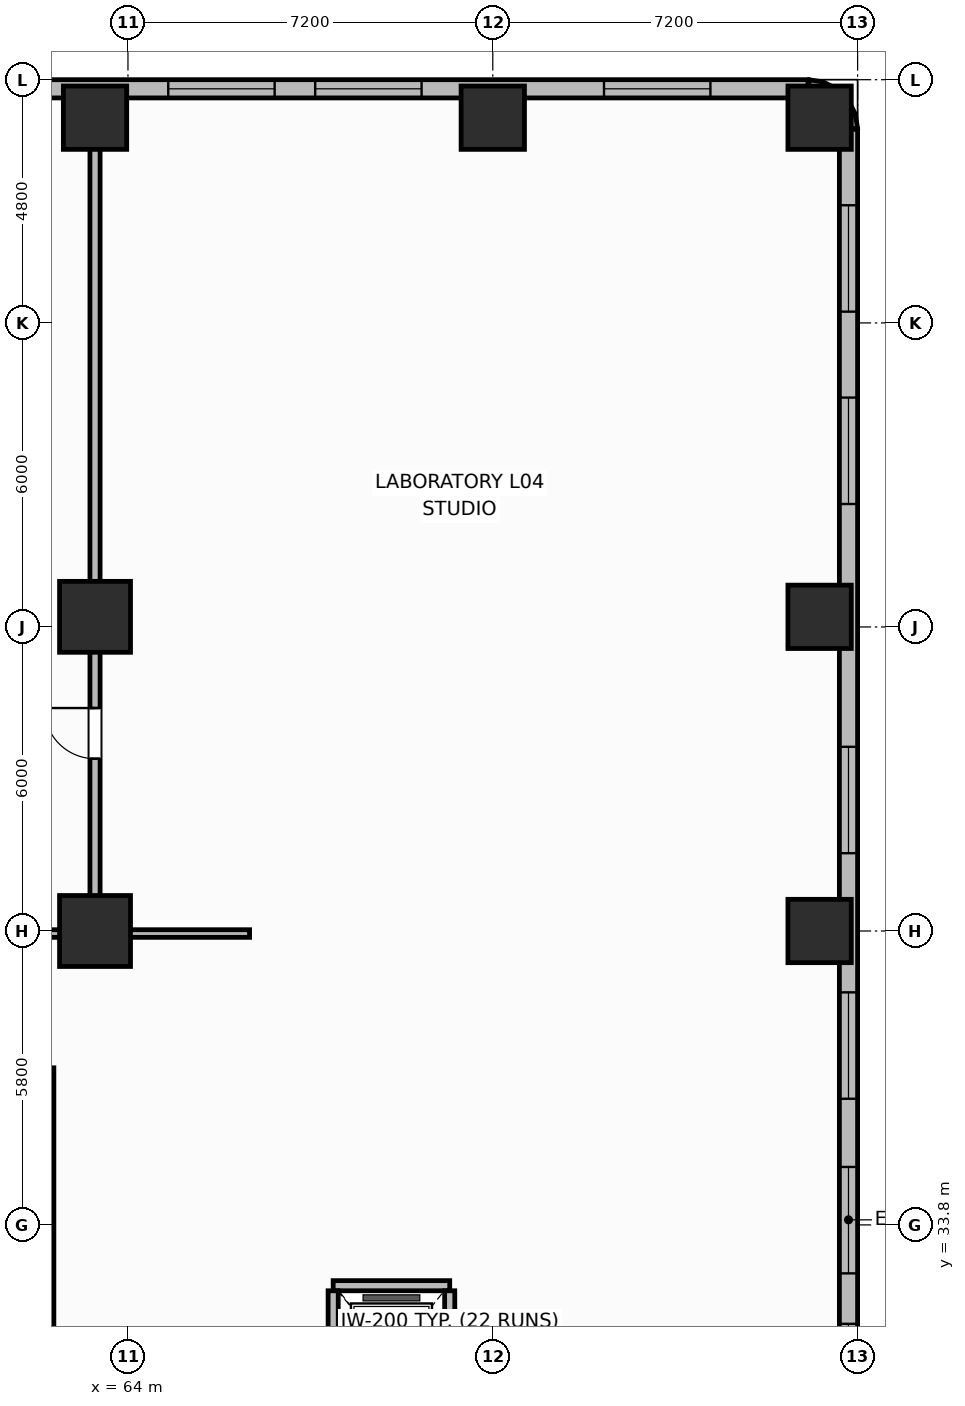
"""IFC4 building model, lengths in metres.
Left out: names, types, materials, properties, quantities, classifications, styles, units other than length and angle.
Written with IfcOpenShell. Run it as: python <this file> out.ifc"""

import sys

from ifc_helpers import new_model, si_unit, direction, frame, frame_2d, origin, origin_2d, place, context, subcontext, project, spatial, rectangle, extrude, element, fill, save


model = new_model("IFC4")
c1 = context("Model", 3, precision=1e-05, world=origin(), true_north=direction((0.0, 1.0)))
c2 = subcontext(c1, "Body", "Model", "MODEL_VIEW")
j1 = project(units=[si_unit("LENGTHUNIT", "METRE"), si_unit("PLANEANGLEUNIT", "RADIAN")], contexts=[c1])
p1 = place(None, origin())
s1 = spatial("IfcSite", under=j1, at=p1, CompositionType="ELEMENT")
p2 = place(p1, origin())
s2 = spatial("IfcBuilding", under=s1, at=p2, CompositionType="ELEMENT")
p3 = place(p2, frame((0.0, 0.0, 20.1)))
s3 = spatial("IfcBuildingStorey", under=s2, at=p3, CompositionType="ELEMENT", Elevation=20.1)
for number, where, z_axis, x_axis in (
    (1, (63.35, 55.65, 0.0), (0.0, 0.0, 1.0), (1.0, 0.0, 0.0)),
    (2, (71.2, 55.65, 0.0), (0.0, 0.0, 1.0), (1.0, 0.0, 0.0)),
    (3, (77.65, 39.6, 0.0), (0.0, 0.0, 1.0), (1.0, 0.0, 0.0)),
    (4, (77.65, 45.8, 0.0), (0.0, 0.0, 1.0), (1.0, 0.0, 0.0)),
    (5, (77.65, 55.65, 0.0), (0.0, 0.0, 1.0), (1.0, 0.0, 0.0)),
):
    element("IfcColumn", number, at=place(p3, frame(where, z_axis=z_axis, x_axis=x_axis)), inside=s3, PredefinedType="COLUMN", context=c2, shape_type="SweptSolid", body=[
        extrude(rectangle(XDim=1.25, YDim=1.25, at=origin_2d()), origin(), (0.0, 0.0, 1.0), 4.5),
    ])
for number, where, z_axis, x_axis in (
    (6, (63.35, 39.6, 0.0), (0.0, 0.0, 1.0), (1.0, 0.0, 0.0)),
    (7, (63.35, 45.8, 0.0), (0.0, 0.0, 1.0), (1.0, 0.0, 0.0)),
):
    element("IfcColumn", number, at=place(p3, frame(where, z_axis=z_axis, x_axis=x_axis)), inside=s3, PredefinedType="COLUMN", context=c2, shape_type="SweptSolid", body=[
        extrude(rectangle(XDim=1.4, YDim=1.4, at=origin_2d()), origin(), (0.0, 0.0, 1.0), 4.5),
    ])
p4 = place(p3, frame((78.22, 0.98, 0.0), z_axis=(0.0, 0.0, 1.0), x_axis=(0.0, 1.0, 0.0)))
e8 = element("IfcWall", 8, at=p4, inside=s3, PredefinedType="SOLIDWALL", context=c2, shape_type="SweptSolid", body=[
    extrude(rectangle(XDim=54.44, YDim=0.36, at=frame_2d((27.22, 0.0))), origin(), (0.0, 0.0, 1.0), 2.3),
])
p5 = place(p4, frame((1.498, 0.0, 0.3)))
e9 = element("IfcOpeningElement", 9, at=p5, cuts=e8, PredefinedType="OPENING", context=c2, shape_type="SweptSolid", body=[
    extrude(rectangle(XDim=2.1, YDim=2.2, at=frame_2d((1.05, 1.1))), frame((0.0, 0.19, 0.0), z_axis=(0.0, -1.0, 0.0), x_axis=(1.0, 0.0, 0.0)), (0.0, 0.0, 1.0), 0.38),
])
p6 = place(p4, frame((5.294, 0.0, 0.3)))
e10 = element("IfcOpeningElement", 10, at=p6, cuts=e8, PredefinedType="OPENING", context=c2, shape_type="SweptSolid", body=[
    extrude(rectangle(XDim=2.1, YDim=2.2, at=frame_2d((1.05, 1.1))), frame((0.0, 0.19, 0.0), z_axis=(0.0, -1.0, 0.0), x_axis=(1.0, 0.0, 0.0)), (0.0, 0.0, 1.0), 0.38),
])
p7 = place(p4, frame((12.185, 0.0, 0.3)))
e11 = element("IfcOpeningElement", 11, at=p7, cuts=e8, PredefinedType="OPENING", context=c2, shape_type="SweptSolid", body=[
    extrude(rectangle(XDim=2.1, YDim=2.2, at=frame_2d((1.05, 1.1))), frame((0.0, 0.19, 0.0), z_axis=(0.0, -1.0, 0.0), x_axis=(1.0, 0.0, 0.0)), (0.0, 0.0, 1.0), 0.38),
])
p8 = place(p4, frame((17.031, 0.0, 0.3)))
e12 = element("IfcOpeningElement", 12, at=p8, cuts=e8, PredefinedType="OPENING", context=c2, shape_type="SweptSolid", body=[
    extrude(rectangle(XDim=2.1, YDim=2.2, at=frame_2d((1.05, 1.1))), frame((0.0, 0.19, 0.0), z_axis=(0.0, -1.0, 0.0), x_axis=(1.0, 0.0, 0.0)), (0.0, 0.0, 1.0), 0.38),
])
p9 = place(p4, frame((20.476, 0.0, 0.3)))
e13 = element("IfcOpeningElement", 13, at=p9, cuts=e8, PredefinedType="OPENING", context=c2, shape_type="SweptSolid", body=[
    extrude(rectangle(XDim=2.1, YDim=2.2, at=frame_2d((1.05, 1.1))), frame((0.0, 0.19, 0.0), z_axis=(0.0, -1.0, 0.0), x_axis=(1.0, 0.0, 0.0)), (0.0, 0.0, 1.0), 0.38),
])
p10 = place(p4, frame((23.572, 0.0, 0.3)))
e14 = element("IfcOpeningElement", 14, at=p10, cuts=e8, PredefinedType="OPENING", context=c2, shape_type="SweptSolid", body=[
    extrude(rectangle(XDim=2.1, YDim=2.2, at=frame_2d((1.05, 1.1))), frame((0.0, 0.19, 0.0), z_axis=(0.0, -1.0, 0.0), x_axis=(1.0, 0.0, 0.0)), (0.0, 0.0, 1.0), 0.38),
])
p11 = place(p4, frame((28.768, 0.0, 0.3)))
e15 = element("IfcOpeningElement", 15, at=p11, cuts=e8, PredefinedType="OPENING", context=c2, shape_type="SweptSolid", body=[
    extrude(rectangle(XDim=2.1, YDim=2.2, at=frame_2d((1.05, 1.1))), frame((0.0, 0.19, 0.0), z_axis=(0.0, -1.0, 0.0), x_axis=(1.0, 0.0, 0.0)), (0.0, 0.0, 1.0), 0.38),
])
p12 = place(p4, frame((31.864, 0.0, 0.3)))
e16 = element("IfcOpeningElement", 16, at=p12, cuts=e8, PredefinedType="OPENING", context=c2, shape_type="SweptSolid", body=[
    extrude(rectangle(XDim=2.1, YDim=2.2, at=frame_2d((1.05, 1.1))), frame((0.0, 0.19, 0.0), z_axis=(0.0, -1.0, 0.0), x_axis=(1.0, 0.0, 0.0)), (0.0, 0.0, 1.0), 0.38),
])
p13 = place(p4, frame((35.309, 0.0, 0.3)))
e17 = element("IfcOpeningElement", 17, at=p13, cuts=e8, PredefinedType="OPENING", context=c2, shape_type="SweptSolid", body=[
    extrude(rectangle(XDim=2.1, YDim=2.2, at=frame_2d((1.05, 1.1))), frame((0.0, 0.19, 0.0), z_axis=(0.0, -1.0, 0.0), x_axis=(1.0, 0.0, 0.0)), (0.0, 0.0, 1.0), 0.38),
])
p14 = place(p4, frame((40.155, 0.0, 0.3)))
e18 = element("IfcOpeningElement", 18, at=p14, cuts=e8, PredefinedType="OPENING", context=c2, shape_type="SweptSolid", body=[
    extrude(rectangle(XDim=2.1, YDim=2.2, at=frame_2d((1.05, 1.1))), frame((0.0, 0.19, 0.0), z_axis=(0.0, -1.0, 0.0), x_axis=(1.0, 0.0, 0.0)), (0.0, 0.0, 1.0), 0.38),
])
p15 = place(p4, frame((47.046, 0.0, 0.3)))
e19 = element("IfcOpeningElement", 19, at=p15, cuts=e8, PredefinedType="OPENING", context=c2, shape_type="SweptSolid", body=[
    extrude(rectangle(XDim=2.1, YDim=2.2, at=frame_2d((1.05, 1.1))), frame((0.0, 0.19, 0.0), z_axis=(0.0, -1.0, 0.0), x_axis=(1.0, 0.0, 0.0)), (0.0, 0.0, 1.0), 0.38),
])
p16 = place(p4, frame((50.842, 0.0, 0.3)))
e20 = element("IfcOpeningElement", 20, at=p16, cuts=e8, PredefinedType="OPENING", context=c2, shape_type="SweptSolid", body=[
    extrude(rectangle(XDim=2.1, YDim=2.2, at=frame_2d((1.05, 1.1))), frame((0.0, 0.19, 0.0), z_axis=(0.0, -1.0, 0.0), x_axis=(1.0, 0.0, 0.0)), (0.0, 0.0, 1.0), 0.38),
])
p17 = place(p3, frame((78.22, 55.42, 0.0), z_axis=(0.0, 0.0, 1.0), x_axis=(-0.156012644899, 0.987755058014, 0.0)))
e21 = element("IfcWall", 21, at=p17, inside=s3, PredefinedType="SOLIDWALL", context=c2, shape_type="SweptSolid", body=[
    extrude(rectangle(XDim=0.25, YDim=0.36, at=frame_2d((0.125, 0.0))), origin(), (0.0, 0.0, 1.0), 2.3),
])
for number, where, z_axis, x_axis in (
    (22, (78.181, 55.667, 0.0), (0.0, 0.0, 1.0), (-0.455, 0.891, 0.0)),
    (23, (78.067, 55.89, 0.0), (0.0, 0.0, 1.0), (-0.707, 0.707, 0.0)),
    (24, (77.89, 56.067, 0.0), (0.0, 0.0, 1.0), (-0.891, 0.455, 0.0)),
):
    element("IfcWall", number, at=place(p3, frame(where, z_axis=z_axis, x_axis=x_axis)), inside=s3, PredefinedType="SOLIDWALL", context=c2, shape_type="SweptSolid", body=[
        extrude(rectangle(XDim=0.25, YDim=0.36, at=frame_2d((0.125, 0.0))), origin(), (0.0, 0.0, 1.0), 2.3),
    ])
p18 = place(p3, frame((77.667, 56.181, 0.0), z_axis=(0.0, 0.0, 1.0), x_axis=(-0.987755058014, 0.156012644899, 0.0)))
e25 = element("IfcWall", 25, at=p18, inside=s3, PredefinedType="SOLIDWALL", context=c2, shape_type="SweptSolid", body=[
    extrude(rectangle(XDim=0.25, YDim=0.36, at=frame_2d((0.125, 0.0))), origin(), (0.0, 0.0, 1.0), 2.3),
])
p19 = place(p3, frame((77.42, 56.22, 0.0), z_axis=(0.0, 0.0, 1.0), x_axis=(-1.0, 0.0, 0.0)))
e26 = element("IfcWall", 26, at=p19, inside=s3, PredefinedType="SOLIDWALL", context=c2, shape_type="SweptSolid", body=[
    extrude(rectangle(XDim=15.25, YDim=0.36, at=frame_2d((7.625, 0.0))), origin(), (0.0, 0.0, 1.0), 2.3),
])
p20 = place(p19, frame((1.925, 0.0, 0.3)))
e27 = element("IfcOpeningElement", 27, at=p20, cuts=e26, PredefinedType="OPENING", context=c2, shape_type="SweptSolid", body=[
    extrude(rectangle(XDim=2.1, YDim=2.2, at=frame_2d((1.05, 1.1))), frame((0.0, 0.19, 0.0), z_axis=(0.0, -1.0, 0.0), x_axis=(1.0, 0.0, 0.0)), (0.0, 0.0, 1.0), 0.38),
])
p21 = place(p19, frame((7.625, 0.0, 0.3)))
e28 = element("IfcOpeningElement", 28, at=p21, cuts=e26, PredefinedType="OPENING", context=c2, shape_type="SweptSolid", body=[
    extrude(rectangle(XDim=2.1, YDim=2.2, at=frame_2d((1.05, 1.1))), frame((0.0, 0.19, 0.0), z_axis=(0.0, -1.0, 0.0), x_axis=(1.0, 0.0, 0.0)), (0.0, 0.0, 1.0), 0.38),
])
p22 = place(p19, frame((10.525, 0.0, 0.3)))
e29 = element("IfcOpeningElement", 29, at=p22, cuts=e26, PredefinedType="OPENING", context=c2, shape_type="SweptSolid", body=[
    extrude(rectangle(XDim=2.1, YDim=2.2, at=frame_2d((1.05, 1.1))), frame((0.0, 0.19, 0.0), z_axis=(0.0, -1.0, 0.0), x_axis=(1.0, 0.0, 0.0)), (0.0, 0.0, 1.0), 0.38),
])
p23 = place(p3, frame((68.05, 32.6, 0.0), z_axis=(0.0, 0.0, 1.0), x_axis=(1.0, 0.0, 0.0)))
e30 = element("IfcWall", 30, at=p23, inside=s3, PredefinedType="PARTITIONING", context=c2, shape_type="SweptSolid", body=[
    extrude(rectangle(XDim=2.3, YDim=0.2, at=frame_2d((1.15, 0.0))), origin(), (0.0, 0.0, 1.0), 2.26),
])
for number, where, z_axis, x_axis in (
    (31, (68.05, 29.9, 0.0), (0.0, 0.0, 1.0), (0.0, 1.0, 0.0)),
    (32, (70.35, 29.9, 0.0), (0.0, 0.0, 1.0), (0.0, 1.0, 0.0)),
):
    element("IfcWall", number, at=place(p3, frame(where, z_axis=z_axis, x_axis=x_axis)), inside=s3, PredefinedType="PARTITIONING", context=c2, shape_type="SweptSolid", body=[
        extrude(rectangle(XDim=2.6, YDim=0.2, at=frame_2d((1.3, 0.0))), origin(), (0.0, 0.0, 1.0), 2.26),
    ])
p24 = place(p3, frame((62.45, 19.5, 0.0), z_axis=(0.0, 0.0, 1.0), x_axis=(0.0, 1.0, 0.0)))
e33 = element("IfcWall", 33, at=p24, inside=s3, PredefinedType="PARTITIONING", context=c2, shape_type="SweptSolid", body=[
    extrude(rectangle(XDim=17.4, YDim=0.175, at=frame_2d((8.7, 0.0))), origin(), (0.0, 0.0, 1.0), 2.26),
])
p25 = place(p3, frame((63.35, 39.6, 0.0), z_axis=(0.0, 0.0, 1.0), x_axis=(0.0, 1.0, 0.0)))
e34 = element("IfcWall", 34, at=p25, inside=s3, PredefinedType="PARTITIONING", context=c2, shape_type="SweptSolid", body=[
    extrude(rectangle(XDim=16.4, YDim=0.2, at=frame_2d((8.2, 0.0))), origin(), (0.0, 0.0, 1.0), 2.26),
])
p26 = place(p25, frame((3.4, 0.0, 0.0)))
e35 = element("IfcOpeningElement", 35, at=p26, cuts=e34, PredefinedType="OPENING", context=c2, shape_type="SweptSolid", body=[
    extrude(rectangle(XDim=1.0, YDim=2.15, at=frame_2d((0.5, 1.075))), frame((0.0, 0.11, 0.0), z_axis=(0.0, -1.0, 0.0), x_axis=(1.0, 0.0, 0.0)), (0.0, 0.0, 1.0), 0.22),
])
p27 = place(p3, frame((66.4, 39.55, 0.0), z_axis=(0.0, 0.0, 1.0), x_axis=(-1.0, 0.0, 0.0)))
e36 = element("IfcWall", 36, at=p27, inside=s3, PredefinedType="PARTITIONING", context=c2, shape_type="SweptSolid", body=[
    extrude(rectangle(XDim=13.25, YDim=0.15, at=frame_2d((6.625, 0.0))), origin(), (0.0, 0.0, 1.0), 2.26),
])
p28 = place(p27, frame((5.5, 0.0, 0.0)))
e37 = element("IfcOpeningElement", 37, at=p28, cuts=e36, PredefinedType="OPENING", context=c2, shape_type="SweptSolid", body=[
    extrude(rectangle(XDim=1.0, YDim=2.15, at=frame_2d((0.5, 1.075))), frame((0.0, 0.085, 0.0), z_axis=(0.0, -1.0, 0.0), x_axis=(1.0, 0.0, 0.0)), (0.0, 0.0, 1.0), 0.17),
])
p29 = place(p11, origin())
e38 = element("IfcWindow", 38, at=p29, inside=s3, PartitioningType="SINGLE_PANEL", PredefinedType="WINDOW", context=c2, shape_type="SweptSolid", body=[
    extrude(rectangle(XDim=2.1, YDim=2.2, at=frame_2d((1.05, 1.1))), frame((0.0, 0.03, 0.0), z_axis=(0.0, -1.0, 0.0), x_axis=(1.0, 0.0, 0.0)), (0.0, 0.0, 1.0), 0.06),
])
fill(e15, e38)
p30 = place(p12, origin())
e39 = element("IfcWindow", 39, at=p30, inside=s3, PartitioningType="SINGLE_PANEL", PredefinedType="WINDOW", context=c2, shape_type="SweptSolid", body=[
    extrude(rectangle(XDim=2.1, YDim=2.2, at=frame_2d((1.05, 1.1))), frame((0.0, 0.03, 0.0), z_axis=(0.0, -1.0, 0.0), x_axis=(1.0, 0.0, 0.0)), (0.0, 0.0, 1.0), 0.06),
])
fill(e16, e39)
p31 = place(p13, origin())
e40 = element("IfcWindow", 40, at=p31, inside=s3, PartitioningType="SINGLE_PANEL", PredefinedType="WINDOW", context=c2, shape_type="SweptSolid", body=[
    extrude(rectangle(XDim=2.1, YDim=2.2, at=frame_2d((1.05, 1.1))), frame((0.0, 0.03, 0.0), z_axis=(0.0, -1.0, 0.0), x_axis=(1.0, 0.0, 0.0)), (0.0, 0.0, 1.0), 0.06),
])
fill(e17, e40)
p32 = place(p14, origin())
e41 = element("IfcWindow", 41, at=p32, inside=s3, PartitioningType="SINGLE_PANEL", PredefinedType="WINDOW", context=c2, shape_type="SweptSolid", body=[
    extrude(rectangle(XDim=2.1, YDim=2.2, at=frame_2d((1.05, 1.1))), frame((0.0, 0.03, 0.0), z_axis=(0.0, -1.0, 0.0), x_axis=(1.0, 0.0, 0.0)), (0.0, 0.0, 1.0), 0.06),
])
fill(e18, e41)
p33 = place(p15, origin())
e42 = element("IfcWindow", 42, at=p33, inside=s3, PartitioningType="SINGLE_PANEL", PredefinedType="WINDOW", context=c2, shape_type="SweptSolid", body=[
    extrude(rectangle(XDim=2.1, YDim=2.2, at=frame_2d((1.05, 1.1))), frame((0.0, 0.03, 0.0), z_axis=(0.0, -1.0, 0.0), x_axis=(1.0, 0.0, 0.0)), (0.0, 0.0, 1.0), 0.06),
])
fill(e19, e42)
p34 = place(p16, origin())
e43 = element("IfcWindow", 43, at=p34, inside=s3, PartitioningType="SINGLE_PANEL", PredefinedType="WINDOW", context=c2, shape_type="SweptSolid", body=[
    extrude(rectangle(XDim=2.1, YDim=2.2, at=frame_2d((1.05, 1.1))), frame((0.0, 0.03, 0.0), z_axis=(0.0, -1.0, 0.0), x_axis=(1.0, 0.0, 0.0)), (0.0, 0.0, 1.0), 0.06),
])
fill(e20, e43)
p35 = place(p20, origin())
e44 = element("IfcWindow", 44, at=p35, inside=s3, PartitioningType="SINGLE_PANEL", PredefinedType="WINDOW", context=c2, shape_type="SweptSolid", body=[
    extrude(rectangle(XDim=2.1, YDim=2.2, at=frame_2d((1.05, 1.1))), frame((0.0, 0.03, 0.0), z_axis=(0.0, -1.0, 0.0), x_axis=(1.0, 0.0, 0.0)), (0.0, 0.0, 1.0), 0.06),
])
fill(e27, e44)
p36 = place(p21, origin())
e45 = element("IfcWindow", 45, at=p36, inside=s3, PartitioningType="SINGLE_PANEL", PredefinedType="WINDOW", context=c2, shape_type="SweptSolid", body=[
    extrude(rectangle(XDim=2.1, YDim=2.2, at=frame_2d((1.05, 1.1))), frame((0.0, 0.03, 0.0), z_axis=(0.0, -1.0, 0.0), x_axis=(1.0, 0.0, 0.0)), (0.0, 0.0, 1.0), 0.06),
])
fill(e28, e45)
p37 = place(p22, origin())
e46 = element("IfcWindow", 46, at=p37, inside=s3, PartitioningType="SINGLE_PANEL", PredefinedType="WINDOW", context=c2, shape_type="SweptSolid", body=[
    extrude(rectangle(XDim=2.1, YDim=2.2, at=frame_2d((1.05, 1.1))), frame((0.0, 0.03, 0.0), z_axis=(0.0, -1.0, 0.0), x_axis=(1.0, 0.0, 0.0)), (0.0, 0.0, 1.0), 0.06),
])
fill(e29, e46)
p38 = place(p26, origin())
e47 = element("IfcDoor", 47, at=p38, inside=s3, OperationType="SINGLE_SWING_RIGHT", PredefinedType="DOOR", context=c2, shape_type="SweptSolid", body=[
    extrude(rectangle(XDim=1.0, YDim=2.15, at=frame_2d((0.5, 1.075))), frame((0.0, 0.025, 0.0), z_axis=(0.0, -1.0, 0.0), x_axis=(1.0, 0.0, 0.0)), (0.0, 0.0, 1.0), 0.05),
])
fill(e35, e47)
save(model, sys.argv[1])
